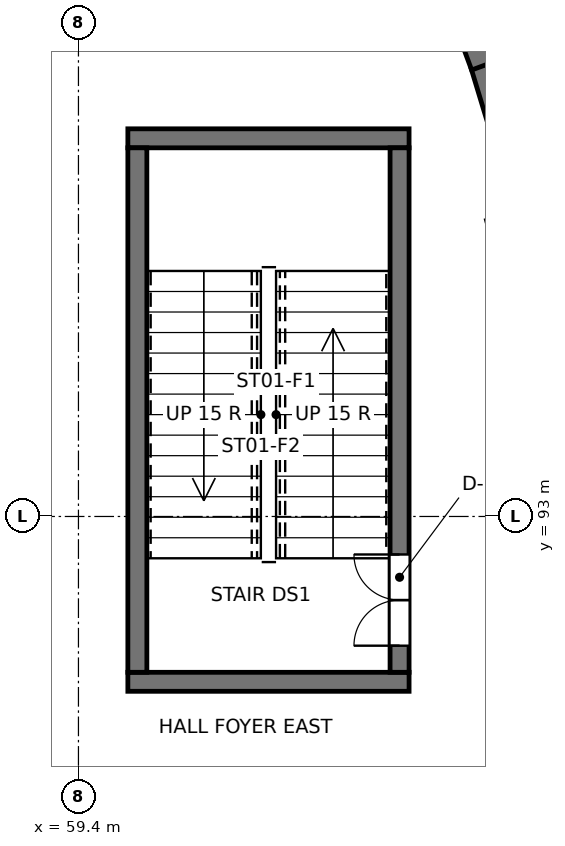
"""IFC4 building model, lengths in metres.
Left out: names, types, materials, properties, quantities, classifications, styles, units other than length and angle.
Written with IfcOpenShell. Run it as: python <this file> out.ifc"""

import sys

from ifc_helpers import new_model, si_unit, direction, frame, frame_2d, origin, place, context, subcontext, project, spatial, rectangle, extrude, element, fill, save


model = new_model("IFC4")
c1 = context("Model", 3, precision=1e-05, world=origin(), true_north=direction((0.0, 1.0)))
c2 = subcontext(c1, "Body", "Model", "MODEL_VIEW")
j1 = project(units=[si_unit("LENGTHUNIT", "METRE"), si_unit("PLANEANGLEUNIT", "RADIAN")], contexts=[c1])
p1 = place(None, origin())
s1 = spatial("IfcSite", under=j1, at=p1, CompositionType="ELEMENT")
p2 = place(p1, origin())
s2 = spatial("IfcBuilding", under=s1, at=p2, CompositionType="ELEMENT")
p3 = place(p2, frame((0.0, 0.0, 4.8)))
s3 = spatial("IfcBuildingStorey", under=s2, at=p3, CompositionType="ELEMENT", Elevation=4.8)
for number, where, z_axis, x_axis in (
    (1, (65.515, 96.631, 0.0), (0.0, 0.0, 1.0), (-0.291, 0.957, 0.0)),
    (2, (64.808, 98.96, 0.0), (0.0, 0.0, 1.0), (-0.347, 0.938, 0.0)),
):
    element("IfcWall", number, at=place(p3, frame(where, z_axis=z_axis, x_axis=x_axis)), inside=s3, PredefinedType="SOLIDWALL", context=c2, shape_type="SweptSolid", body=[
        extrude(rectangle(XDim=2.434, YDim=0.5, at=frame_2d((1.217, 0.0))), origin(), (0.0, 0.0, 1.0), 4.8),
    ])
for number, where, z_axis, x_axis in (
    (3, (60.05, 90.825, 0.0), (0.0, 0.0, 1.0), (1.0, 0.0, 0.0)),
    (4, (60.05, 97.975, 0.0), (0.0, 0.0, 1.0), (1.0, 0.0, 0.0)),
):
    element("IfcWall", number, at=place(p3, frame(where, z_axis=z_axis, x_axis=x_axis)), inside=s3, PredefinedType="SOLIDWALL", context=c2, shape_type="SweptSolid", body=[
        extrude(rectangle(XDim=3.7, YDim=0.25, at=frame_2d((1.85, 0.0))), origin(), (0.0, 0.0, 1.0), 4.8),
    ])
p4 = place(p3, frame((60.175, 90.95, 0.0), z_axis=(0.0, 0.0, 1.0), x_axis=(0.0, 1.0, 0.0)))
e5 = element("IfcWall", 5, at=p4, inside=s3, PredefinedType="SOLIDWALL", context=c2, shape_type="SweptSolid", body=[
    extrude(rectangle(XDim=6.9, YDim=0.25, at=frame_2d((3.45, 0.0))), origin(), (0.0, 0.0, 1.0), 4.8),
])
p5 = place(p3, frame((63.625, 90.95, 0.0), z_axis=(0.0, 0.0, 1.0), x_axis=(0.0, 1.0, 0.0)))
e6 = element("IfcWall", 6, at=p5, inside=s3, PredefinedType="SOLIDWALL", context=c2, shape_type="SweptSolid", body=[
    extrude(rectangle(XDim=6.9, YDim=0.25, at=frame_2d((3.45, 0.0))), origin(), (0.0, 0.0, 1.0), 4.8),
])
p6 = place(p5, frame((0.35, 0.0, 0.0)))
e7 = element("IfcOpeningElement", 7, at=p6, cuts=e6, PredefinedType="OPENING", context=c2, shape_type="SweptSolid", body=[
    extrude(rectangle(XDim=1.2, YDim=2.1, at=frame_2d((0.6, 1.05))), frame((0.0, 0.135, 0.0), z_axis=(0.0, -1.0, 0.0), x_axis=(1.0, 0.0, 0.0)), (0.0, 0.0, 1.0), 0.27),
])
p7 = place(p6, origin())
e8 = element("IfcDoor", 8, at=p7, inside=s3, OperationType="DOUBLE_DOOR_SINGLE_SWING", PredefinedType="DOOR", context=c2, shape_type="SweptSolid", body=[
    extrude(rectangle(XDim=1.2, YDim=2.1, at=frame_2d((0.6, 1.05))), frame((0.0, 0.025, 0.0), z_axis=(0.0, -1.0, 0.0), x_axis=(1.0, 0.0, 0.0)), (0.0, 0.0, 1.0), 0.05),
])
fill(e7, e8)
save(model, sys.argv[1])
